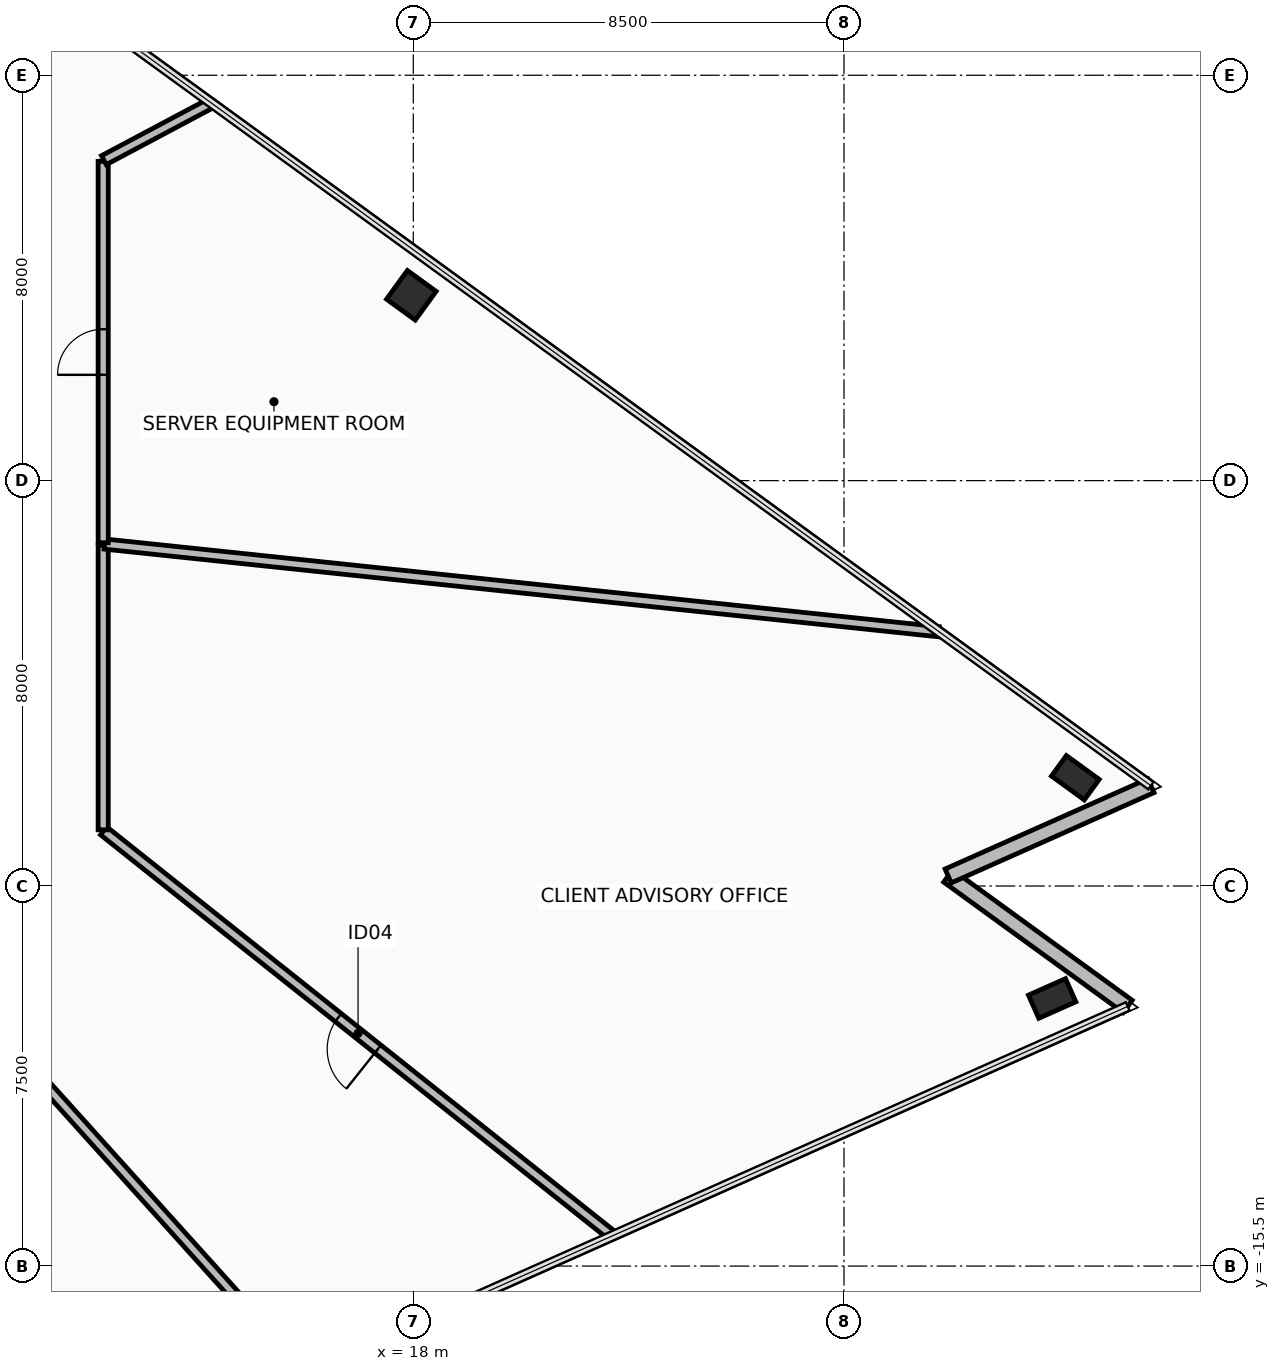
"""IFC4 building model, lengths in metres.
Left out: names, types, materials, properties, quantities, classifications, styles, units other than length and angle.
Written with IfcOpenShell. Run it as: python <this file> out.ifc"""

import sys

from ifc_helpers import new_model, si_unit, direction, frame, frame_2d, origin, origin_2d, place, context, subcontext, project, spatial, rectangle, hollow_rectangle, extrude, element, fill, save


model = new_model("IFC4")
c1 = context("Model", 3, precision=1e-05, world=origin(), true_north=direction((0.0, 1.0)))
c2 = subcontext(c1, "Body", "Model", "MODEL_VIEW")
j1 = project(units=[si_unit("LENGTHUNIT", "METRE"), si_unit("PLANEANGLEUNIT", "RADIAN")], contexts=[c1])
p1 = place(None, origin())
s1 = spatial("IfcSite", under=j1, at=p1, CompositionType="ELEMENT")
p2 = place(p1, origin())
s2 = spatial("IfcBuilding", under=s1, at=p2, CompositionType="ELEMENT")
p3 = place(p2, frame((0.0, 0.0, 126.85)))
s3 = spatial("IfcBuildingStorey", under=s2, at=p3, CompositionType="ELEMENT", Elevation=126.85)
for number, where, z_axis, x_axis in (
    (1, (30.608, -10.219, 0.0), (0.0, 0.0, 1.0), (0.914, 0.407, 0.0)),
    (2, (31.066, -5.863, 0.0), (0.0, 0.0, 1.0), (-0.809, 0.588, 0.0)),
):
    element("IfcColumn", number, at=place(p3, frame(where, z_axis=z_axis, x_axis=x_axis)), inside=s3, PredefinedType="COLUMN", context=c2, shape_type="SweptSolid", body=[
        extrude(hollow_rectangle(XDim=0.5, YDim=0.8, WallThickness=0.04, at=origin_2d()), origin(), (0.0, 0.0, 1.0), 3.6),
    ])
p4 = place(p3, frame((17.961, 3.658, 0.0), z_axis=(0.0, 0.0, 1.0), x_axis=(-0.809016994375, 0.587785252292, 0.0)))
e3 = element("IfcColumn", 3, at=p4, inside=s3, PredefinedType="COLUMN", context=c2, shape_type="SweptSolid", body=[
    extrude(hollow_rectangle(XDim=0.7, YDim=0.7, WallThickness=0.04, at=origin_2d()), origin(), (0.0, 0.0, 1.0), 3.6),
])
for number, where, z_axis, x_axis in (
    (4, (32.1, -10.376, 0.0), (0.0, 0.0, 1.0), (-0.809, 0.588, 0.0)),
    (5, (28.556, -7.802, 0.0), (0.0, 0.0, 1.0), (0.914, 0.407, 0.0)),
):
    element("IfcWall", number, at=place(p3, frame(where, z_axis=z_axis, x_axis=x_axis)), inside=s3, PredefinedType="STANDARD", context=c2, shape_type="SweptSolid", body=[
        extrude(rectangle(XDim=4.38, YDim=0.3, at=frame_2d((2.19, 0.0))), origin(), (0.0, 0.0, 1.0), 2.705),
    ])
p5 = place(p3, frame((9.534, -10.588, 0.0), z_axis=(0.0, 0.0, 1.0), x_axis=(0.669143190424, -0.743133494541, 0.0)))
e6 = element("IfcWall", 6, at=p5, inside=s3, PredefinedType="PARTITIONING", context=c2, shape_type="SweptSolid", body=[
    extrude(rectangle(XDim=9.447, YDim=0.2, at=frame_2d((4.723, 0.0))), origin(), (0.0, 0.0, 1.0), 2.705),
])
p6 = place(p3, frame((21.93, -14.904, 0.0), z_axis=(0.0, 0.0, 1.0), x_axis=(-0.782382790893, 0.622797855258, 0.0)))
e7 = element("IfcWall", 7, at=p6, inside=s3, PredefinedType="PARTITIONING", context=c2, shape_type="SweptSolid", body=[
    extrude(rectangle(XDim=12.834, YDim=0.2, at=frame_2d((6.417, 0.0))), origin(), (0.0, 0.0, 1.0), 2.705),
])
p7 = place(p6, frame((5.917, 0.0, 0.0)))
e8 = element("IfcOpeningElement", 8, at=p7, cuts=e7, PredefinedType="OPENING", context=c2, shape_type="SweptSolid", body=[
    extrude(rectangle(XDim=1.0, YDim=2.15, at=frame_2d((0.5, 1.075))), frame((0.0, 0.11, 0.0), z_axis=(0.0, -1.0, 0.0), x_axis=(1.0, 0.0, 0.0)), (0.0, 0.0, 1.0), 0.22),
])
p8 = place(p3, frame((11.88, -6.891, 0.0), z_axis=(0.0, 0.0, 1.0), x_axis=(0.0, 1.0, 0.0)))
e9 = element("IfcWall", 9, at=p8, inside=s3, PredefinedType="PARTITIONING", context=c2, shape_type="SweptSolid", body=[
    extrude(rectangle(XDim=5.615, YDim=0.2, at=frame_2d((2.808, 0.0))), origin(), (0.0, 0.0, 1.0), 3.41),
])
p9 = place(p3, frame((11.908, -1.251, 0.0), z_axis=(0.0, 0.0, 1.0), x_axis=(0.994520958229, -0.104537379166, 0.0)))
e10 = element("IfcWall", 10, at=p9, inside=s3, PredefinedType="PARTITIONING", context=c2, shape_type="SweptSolid", body=[
    extrude(rectangle(XDim=16.553, YDim=0.2, at=frame_2d((8.277, 0.0))), origin(), (0.0, 0.0, 1.0), 2.705),
])
p10 = place(p3, frame((11.88, -1.226, 0.0), z_axis=(0.0, 0.0, 1.0), x_axis=(0.0, 1.0, 0.0)))
e11 = element("IfcWall", 11, at=p10, inside=s3, PredefinedType="PARTITIONING", context=c2, shape_type="SweptSolid", body=[
    extrude(rectangle(XDim=7.528, YDim=0.2, at=frame_2d((3.764, 0.0))), origin(), (0.0, 0.0, 1.0), 2.855),
])
p11 = place(p10, frame((3.314, 0.0, 0.0)))
e12 = element("IfcOpeningElement", 12, at=p11, cuts=e11, PredefinedType="OPENING", context=c2, shape_type="SweptSolid", body=[
    extrude(rectangle(XDim=0.9, YDim=2.1, at=frame_2d((0.45, 1.05))), frame((0.0, 0.11, 0.0), z_axis=(0.0, -1.0, 0.0), x_axis=(1.0, 0.0, 0.0)), (0.0, 0.0, 1.0), 0.22),
])
p12 = place(p3, frame((11.893, 6.324, 0.0), z_axis=(0.0, 0.0, 1.0), x_axis=(0.882960772141, 0.469446775321, 0.0)))
e13 = element("IfcWall", 13, at=p12, inside=s3, PredefinedType="PARTITIONING", context=c2, shape_type="SweptSolid", body=[
    extrude(rectangle(XDim=2.388, YDim=0.2, at=frame_2d((1.194, 0.0))), origin(), (0.0, 0.0, 1.0), 2.705),
])
p13 = place(p7, origin())
e14 = element("IfcDoor", 14, at=p13, inside=s3, OperationType="SINGLE_SWING_RIGHT", PredefinedType="DOOR", context=c2, shape_type="SweptSolid", body=[
    extrude(rectangle(XDim=1.0, YDim=2.15, at=frame_2d((0.5, 1.075))), frame((0.0, 0.025, 0.0), z_axis=(0.0, -1.0, 0.0), x_axis=(1.0, 0.0, 0.0)), (0.0, 0.0, 1.0), 0.05),
])
fill(e8, e14)
p14 = place(p11, origin())
e15 = element("IfcDoor", 15, at=p14, inside=s3, OperationType="SINGLE_SWING_LEFT", PredefinedType="DOOR", context=c2, shape_type="SweptSolid", body=[
    extrude(rectangle(XDim=0.9, YDim=2.1, at=frame_2d((0.45, 1.05))), frame((0.0, 0.025, 0.0), z_axis=(0.0, -1.0, 0.0), x_axis=(1.0, 0.0, 0.0)), (0.0, 0.0, 1.0), 0.05),
])
fill(e12, e15)
save(model, sys.argv[1])
